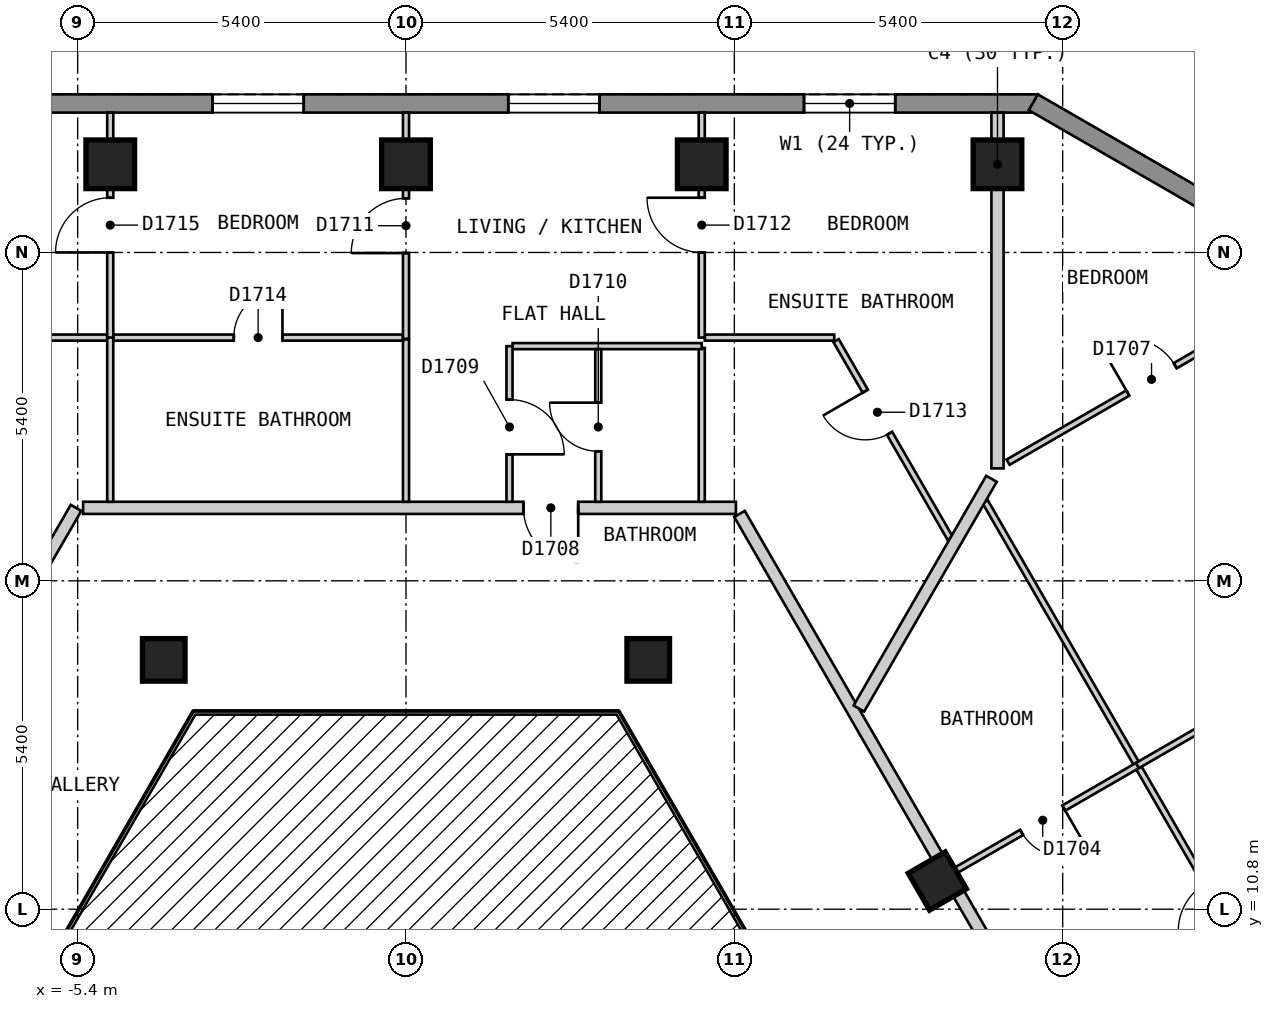
"""IFC4 building model, lengths in metres.
Left out: names, types, materials, properties, quantities, classifications, styles, units other than length and angle.
Written with IfcOpenShell. Run it as: python <this file> out.ifc"""

import sys

from ifc_helpers import new_model, si_unit, direction, frame, frame_2d, origin, origin_2d, place, context, subcontext, project, spatial, polyline, rectangle, outline, extrude, element, fill, save


model = new_model("IFC4")
c1 = context("Model", 3, precision=1e-05, world=origin(), true_north=direction((0.0, 1.0)))
c2 = subcontext(c1, "Body", "Model", "MODEL_VIEW")
j1 = project(units=[si_unit("LENGTHUNIT", "METRE"), si_unit("PLANEANGLEUNIT", "RADIAN")], contexts=[c1])
p1 = place(None, origin())
s1 = spatial("IfcSite", under=j1, at=p1, CompositionType="ELEMENT")
p2 = place(p1, origin())
s2 = spatial("IfcBuilding", under=s1, at=p2, CompositionType="ELEMENT")
p3 = place(p2, frame((0.0, 0.0, 187.2)))
s3 = spatial("IfcBuildingStorey", under=s2, at=p3, CompositionType="ELEMENT", Elevation=187.2)
for number, where, z_axis, x_axis in (
    (1, (9.728, 23.05, 0.0), (0.0, 0.0, 1.0), (-1.0, 0.0, 0.0)),
    (2, (4.864, 23.05, 0.0), (0.0, 0.0, 1.0), (-1.0, 0.0, 0.0)),
    (3, (0.0, 23.05, 0.0), (0.0, 0.0, 1.0), (-1.0, 0.0, 0.0)),
    (4, (-4.864, 23.05, 0.0), (0.0, 0.0, 1.0), (-1.0, 0.0, 0.0)),
):
    element("IfcColumn", number, at=place(p3, frame(where, z_axis=z_axis, x_axis=x_axis)), inside=s3, PredefinedType="COLUMN", context=c2, shape_type="SweptSolid", body=[
        extrude(rectangle(XDim=0.8, YDim=0.8, at=origin_2d()), origin(), (0.0, 0.0, 1.0), 3.0),
    ])
for number, where, z_axis, x_axis in (
    (5, (8.739, 11.263, 0.0), (0.0, 0.0, 1.0), (-0.5, 0.866, 0.0)),
    (6, (3.984, 14.9, 0.0), (0.0, 0.0, 1.0), (1.0, 0.0, 0.0)),
    (7, (-3.984, 14.9, 0.0), (0.0, 0.0, 1.0), (1.0, 0.0, 0.0)),
):
    element("IfcColumn", number, at=place(p3, frame(where, z_axis=z_axis, x_axis=x_axis)), inside=s3, PredefinedType="COLUMN", context=c2, shape_type="SweptSolid", body=[
        extrude(rectangle(XDim=0.7, YDim=0.7, at=origin_2d()), origin(), (0.0, 0.0, 1.0), 3.0),
    ])
p4 = place(p3, frame((10.392, 24.05, 0.0), z_axis=(0.0, 0.0, 1.0), x_axis=(-1.0, 0.0, 0.0)))
e8 = element("IfcWall", 8, at=p4, inside=s3, PredefinedType="SOLIDWALL", context=c2, shape_type="SweptSolid", body=[
    extrude(outline(polyline([(0.0, -0.15), (20.784, -0.15), (20.704, 0.15), (0.08, 0.15), (0.0, -0.15)])), origin(), (0.0, 0.0, 1.0), 2.7),
])
p5 = place(p4, frame((2.346, 0.0, 0.15)))
e9 = element("IfcOpeningElement", 9, at=p5, cuts=e8, PredefinedType="OPENING", context=c2, shape_type="SweptSolid", body=[
    extrude(rectangle(XDim=1.5, YDim=2.1, at=frame_2d((0.75, 1.05))), frame((0.0, 0.16, 0.0), z_axis=(0.0, -1.0, 0.0), x_axis=(1.0, 0.0, 0.0)), (0.0, 0.0, 1.0), 0.32),
])
p6 = place(p4, frame((7.21, 0.0, 0.15)))
e10 = element("IfcOpeningElement", 10, at=p6, cuts=e8, PredefinedType="OPENING", context=c2, shape_type="SweptSolid", body=[
    extrude(rectangle(XDim=1.5, YDim=2.1, at=frame_2d((0.75, 1.05))), frame((0.0, 0.16, 0.0), z_axis=(0.0, -1.0, 0.0), x_axis=(1.0, 0.0, 0.0)), (0.0, 0.0, 1.0), 0.32),
])
p7 = place(p4, frame((12.074, 0.0, 0.15)))
e11 = element("IfcOpeningElement", 11, at=p7, cuts=e8, PredefinedType="OPENING", context=c2, shape_type="SweptSolid", body=[
    extrude(rectangle(XDim=1.5, YDim=2.1, at=frame_2d((0.75, 1.05))), frame((0.0, 0.16, 0.0), z_axis=(0.0, -1.0, 0.0), x_axis=(1.0, 0.0, 0.0)), (0.0, 0.0, 1.0), 0.32),
])
p8 = place(p4, frame((16.938, 0.0, 0.15)))
e12 = element("IfcOpeningElement", 12, at=p8, cuts=e8, PredefinedType="OPENING", context=c2, shape_type="SweptSolid", body=[
    extrude(rectangle(XDim=1.5, YDim=2.1, at=frame_2d((0.75, 1.05))), frame((0.0, 0.16, 0.0), z_axis=(0.0, -1.0, 0.0), x_axis=(1.0, 0.0, 0.0)), (0.0, 0.0, 1.0), 0.32),
])
p9 = place(p3, frame((14.647, 21.57, 0.0), z_axis=(0.0, 0.0, 1.0), x_axis=(-0.866022959057, 0.500004234368, 0.0)))
e13 = element("IfcWall", 13, at=p9, inside=s3, PredefinedType="SOLIDWALL", context=c2, shape_type="SweptSolid", body=[
    extrude(outline(polyline([(0.0, -0.15), (5.0, -0.15), (4.92, 0.15), (0.08, 0.15), (0.0, -0.15)])), origin(), (0.0, 0.0, 1.0), 2.7),
])
p10 = place(p9, frame((0.65, 0.0, 0.15)))
e14 = element("IfcOpeningElement", 14, at=p10, cuts=e13, PredefinedType="OPENING", context=c2, shape_type="SweptSolid", body=[
    extrude(rectangle(XDim=1.2, YDim=2.1, at=frame_2d((0.6, 1.05))), frame((0.0, 0.16, 0.0), z_axis=(0.0, -1.0, 0.0), x_axis=(1.0, 0.0, 0.0)), (0.0, 0.0, 1.0), 0.32),
])
p11 = place(p3, frame((5.485, 17.3, 0.0), z_axis=(0.0, 0.0, 1.0), x_axis=(0.499965832213, -0.866045129667, 0.0)))
e15 = element("IfcWall", 15, at=p11, inside=s3, PredefinedType="PARTITIONING", context=c2, shape_type="SweptSolid", body=[
    extrude(rectangle(XDim=10.739, YDim=0.2, at=frame_2d((5.369, 0.0))), origin(), (0.0, 0.0, 1.0), 2.7),
])
p12 = place(p11, frame((9.047, 0.0, 0.0)))
e16 = element("IfcOpeningElement", 16, at=p12, cuts=e15, PredefinedType="OPENING", context=c2, shape_type="SweptSolid", body=[
    extrude(rectangle(XDim=1.0, YDim=2.1, at=frame_2d((0.5, 1.05))), frame((0.0, 0.11, 0.0), z_axis=(0.0, -1.0, 0.0), x_axis=(1.0, 0.0, 0.0)), (0.0, 0.0, 1.0), 0.22),
])
p13 = place(p3, frame((-5.311, 17.4, 0.0), z_axis=(0.0, 0.0, 1.0), x_axis=(1.0, 0.0, 0.0)))
e17 = element("IfcWall", 17, at=p13, inside=s3, PredefinedType="PARTITIONING", context=c2, shape_type="SweptSolid", body=[
    extrude(rectangle(XDim=10.737, YDim=0.2, at=frame_2d((5.369, 0.0))), origin(), (0.0, 0.0, 1.0), 2.7),
])
p14 = place(p13, frame((7.243, 0.0, 0.0)))
e18 = element("IfcOpeningElement", 18, at=p14, cuts=e17, PredefinedType="OPENING", context=c2, shape_type="SweptSolid", body=[
    extrude(rectangle(XDim=0.9, YDim=2.1, at=frame_2d((0.45, 1.05))), frame((0.0, 0.11, 0.0), z_axis=(0.0, -1.0, 0.0), x_axis=(1.0, 0.0, 0.0)), (0.0, 0.0, 1.0), 0.22),
])
p15 = place(p3, frame((-10.771, 8.145, 0.0), z_axis=(0.0, 0.0, 1.0), x_axis=(0.500048075867, 0.865997645391, 0.0)))
e19 = element("IfcWall", 19, at=p15, inside=s3, PredefinedType="PARTITIONING", context=c2, shape_type="SweptSolid", body=[
    extrude(rectangle(XDim=10.687, YDim=0.2, at=frame_2d((5.344, 0.0))), origin(), (0.0, 0.0, 1.0), 2.7),
])
p16 = place(p15, frame((0.549, 0.0, 0.0)))
e20 = element("IfcOpeningElement", 20, at=p16, cuts=e19, PredefinedType="OPENING", context=c2, shape_type="SweptSolid", body=[
    extrude(rectangle(XDim=1.0, YDim=2.1, at=frame_2d((0.5, 1.05))), frame((0.0, 0.11, 0.0), z_axis=(0.0, -1.0, 0.0), x_axis=(1.0, 0.0, 0.0)), (0.0, 0.0, 1.0), 0.22),
])
p17 = place(p3, frame((7.073, 20.15, 0.0), z_axis=(0.0, 0.0, 1.0), x_axis=(0.499917691695, -0.866072919292, 0.0)))
e21 = element("IfcWall", 21, at=p17, inside=s3, PredefinedType="PARTITIONING", context=c2, shape_type="SweptSolid", body=[
    extrude(rectangle(XDim=3.753, YDim=0.1, at=frame_2d((1.876, 0.0))), origin(), (0.0, 0.0, 1.0), 2.7),
])
p18 = place(p17, frame((0.96, 0.0, 0.0)))
e22 = element("IfcOpeningElement", 22, at=p18, cuts=e21, PredefinedType="OPENING", context=c2, shape_type="SweptSolid", body=[
    extrude(rectangle(XDim=0.8, YDim=2.1, at=frame_2d((0.4, 1.05))), frame((0.0, 0.06, 0.0), z_axis=(0.0, -1.0, 0.0), x_axis=(1.0, 0.0, 0.0)), (0.0, 0.0, 1.0), 0.12),
])
p19 = place(p3, frame((9.526, 17.5, 0.0), z_axis=(0.0, 0.0, 1.0), x_axis=(0.500019134094, -0.866014356428, 0.0)))
e23 = element("IfcWall", 23, at=p19, inside=s3, PredefinedType="PARTITIONING", context=c2, shape_type="SweptSolid", body=[
    extrude(rectangle(XDim=10.97, YDim=0.1, at=frame_2d((5.485, 0.0))), origin(), (0.0, 0.0, 1.0), 2.7),
])
p20 = place(p19, frame((7.25, 0.0, 0.0)))
e24 = element("IfcOpeningElement", 24, at=p20, cuts=e23, PredefinedType="OPENING", context=c2, shape_type="SweptSolid", body=[
    extrude(rectangle(XDim=0.9, YDim=2.1, at=frame_2d((0.45, 1.05))), frame((0.0, 0.06, 0.0), z_axis=(0.0, -1.0, 0.0), x_axis=(1.0, 0.0, 0.0)), (0.0, 0.0, 1.0), 0.12),
])
p21 = place(p3, frame((0.0, 20.17, 0.0), z_axis=(0.0, 0.0, 1.0), x_axis=(0.0, -1.0, 0.0)))
e25 = element("IfcWall", 25, at=p21, inside=s3, PredefinedType="PARTITIONING", context=c2, shape_type="SweptSolid", body=[
    extrude(rectangle(XDim=2.67, YDim=0.1, at=frame_2d((1.335, 0.0))), origin(), (0.0, 0.0, 1.0), 2.7),
])
p22 = place(p3, frame((4.864, 20.03, 0.0), z_axis=(0.0, 0.0, 1.0), x_axis=(0.0, -1.0, 0.0)))
e26 = element("IfcWall", 26, at=p22, inside=s3, PredefinedType="PARTITIONING", context=c2, shape_type="SweptSolid", body=[
    extrude(rectangle(XDim=2.53, YDim=0.1, at=frame_2d((1.265, 0.0))), origin(), (0.0, 0.0, 1.0), 2.7),
])
p23 = place(p3, frame((1.753, 20.06, 0.0), z_axis=(0.0, 0.0, 1.0), x_axis=(1.0, 0.0, 0.0)))
e27 = element("IfcWall", 27, at=p23, inside=s3, PredefinedType="PARTITIONING", context=c2, shape_type="SweptSolid", body=[
    extrude(rectangle(XDim=3.111, YDim=0.1, at=frame_2d((1.556, 0.0))), origin(), (0.0, 0.0, 1.0), 2.7),
])
p24 = place(p3, frame((-6.985, 20.2, 0.0), z_axis=(0.0, 0.0, 1.0), x_axis=(1.0, 0.0, 0.0)))
e28 = element("IfcWall", 28, at=p24, inside=s3, PredefinedType="PARTITIONING", context=c2, shape_type="SweptSolid", body=[
    extrude(rectangle(XDim=6.935, YDim=0.1, at=frame_2d((3.468, 0.0))), origin(), (0.0, 0.0, 1.0), 2.7),
])
p25 = place(p24, frame((4.153, 0.0, 0.0)))
e29 = element("IfcOpeningElement", 29, at=p25, cuts=e28, PredefinedType="OPENING", context=c2, shape_type="SweptSolid", body=[
    extrude(rectangle(XDim=0.8, YDim=2.1, at=frame_2d((0.4, 1.05))), frame((0.0, 0.06, 0.0), z_axis=(0.0, -1.0, 0.0), x_axis=(1.0, 0.0, 0.0)), (0.0, 0.0, 1.0), 0.12),
])
p26 = place(p3, frame((4.914, 20.2, 0.0), z_axis=(0.0, 0.0, 1.0), x_axis=(1.0, 0.0, 0.0)))
e30 = element("IfcWall", 30, at=p26, inside=s3, PredefinedType="PARTITIONING", context=c2, shape_type="SweptSolid", body=[
    extrude(rectangle(XDim=2.129, YDim=0.1, at=frame_2d((1.064, 0.0))), origin(), (0.0, 0.0, 1.0), 2.7),
])
p27 = place(p3, frame((3.162, 17.5, 0.0), z_axis=(0.0, 0.0, 1.0), x_axis=(0.0, 1.0, 0.0)))
e31 = element("IfcWall", 31, at=p27, inside=s3, PredefinedType="PARTITIONING", context=c2, shape_type="SweptSolid", body=[
    extrude(rectangle(XDim=2.51, YDim=0.1, at=frame_2d((1.255, 0.0))), origin(), (0.0, 0.0, 1.0), 2.7),
])
p28 = place(p27, frame((0.83, 0.0, 0.0)))
e32 = element("IfcOpeningElement", 32, at=p28, cuts=e31, PredefinedType="OPENING", context=c2, shape_type="SweptSolid", body=[
    extrude(rectangle(XDim=0.8, YDim=2.1, at=frame_2d((0.4, 1.05))), frame((0.0, 0.06, 0.0), z_axis=(0.0, -1.0, 0.0), x_axis=(1.0, 0.0, 0.0)), (0.0, 0.0, 1.0), 0.12),
])
p29 = place(p3, frame((4.864, 20.2, 0.0), z_axis=(0.0, 0.0, 1.0), x_axis=(0.0, 1.0, 0.0)))
e33 = element("IfcWall", 33, at=p29, inside=s3, PredefinedType="PARTITIONING", context=c2, shape_type="SweptSolid", body=[
    extrude(rectangle(XDim=3.7, YDim=0.1, at=frame_2d((1.85, 0.0))), origin(), (0.0, 0.0, 1.0), 2.7),
])
p30 = place(p29, frame((1.4, 0.0, 0.0)))
e34 = element("IfcOpeningElement", 34, at=p30, cuts=e33, PredefinedType="OPENING", context=c2, shape_type="SweptSolid", body=[
    extrude(rectangle(XDim=0.9, YDim=2.1, at=frame_2d((0.45, 1.05))), frame((0.0, 0.06, 0.0), z_axis=(0.0, -1.0, 0.0), x_axis=(1.0, 0.0, 0.0)), (0.0, 0.0, 1.0), 0.12),
])
p31 = place(p3, frame((1.702, 17.5, 0.0), z_axis=(0.0, 0.0, 1.0), x_axis=(0.0, 1.0, 0.0)))
e35 = element("IfcWall", 35, at=p31, inside=s3, PredefinedType="PARTITIONING", context=c2, shape_type="SweptSolid", body=[
    extrude(rectangle(XDim=2.559, YDim=0.1, at=frame_2d((1.28, 0.0))), origin(), (0.0, 0.0, 1.0), 2.7),
])
p32 = place(p31, frame((0.78, 0.0, 0.0)))
e36 = element("IfcOpeningElement", 36, at=p32, cuts=e35, PredefinedType="OPENING", context=c2, shape_type="SweptSolid", body=[
    extrude(rectangle(XDim=0.9, YDim=2.1, at=frame_2d((0.45, 1.05))), frame((0.0, 0.06, 0.0), z_axis=(0.0, -1.0, 0.0), x_axis=(1.0, 0.0, 0.0)), (0.0, 0.0, 1.0), 0.12),
])
p33 = place(p3, frame((0.0, 20.18, 0.0), z_axis=(0.0, 0.0, 1.0), x_axis=(0.0, 1.0, 0.0)))
e37 = element("IfcWall", 37, at=p33, inside=s3, PredefinedType="PARTITIONING", context=c2, shape_type="SweptSolid", body=[
    extrude(rectangle(XDim=3.72, YDim=0.1, at=frame_2d((1.86, 0.0))), origin(), (0.0, 0.0, 1.0), 2.7),
])
p34 = place(p33, frame((1.41, 0.0, 0.0)))
e38 = element("IfcOpeningElement", 38, at=p34, cuts=e37, PredefinedType="OPENING", context=c2, shape_type="SweptSolid", body=[
    extrude(rectangle(XDim=0.9, YDim=2.1, at=frame_2d((0.45, 1.05))), frame((0.0, 0.06, 0.0), z_axis=(0.0, -1.0, 0.0), x_axis=(1.0, 0.0, 0.0)), (0.0, 0.0, 1.0), 0.12),
])
p35 = place(p3, frame((-4.864, 17.5, 0.0), z_axis=(0.0, 0.0, 1.0), x_axis=(0.0, 1.0, 0.0)))
e39 = element("IfcWall", 39, at=p35, inside=s3, PredefinedType="PARTITIONING", context=c2, shape_type="SweptSolid", body=[
    extrude(rectangle(XDim=2.7, YDim=0.1, at=frame_2d((1.35, 0.0))), origin(), (0.0, 0.0, 1.0), 2.7),
])
p36 = place(p3, frame((8.999, 11.413, 0.0), z_axis=(0.0, 0.0, 1.0), x_axis=(0.866019471182, 0.500010275428, 0.0)))
e40 = element("IfcWall", 40, at=p36, inside=s3, PredefinedType="PARTITIONING", context=c2, shape_type="SweptSolid", body=[
    extrude(rectangle(XDim=3.5, YDim=0.1, at=frame_2d((1.75, 0.0))), origin(), (0.0, 0.0, 1.0), 2.7),
])
p37 = place(p36, frame((1.3, 0.0, 0.0)))
e41 = element("IfcOpeningElement", 41, at=p37, cuts=e40, PredefinedType="OPENING", context=c2, shape_type="SweptSolid", body=[
    extrude(rectangle(XDim=0.8, YDim=2.1, at=frame_2d((0.4, 1.05))), frame((0.0, 0.06, 0.0), z_axis=(0.0, -1.0, 0.0), x_axis=(1.0, 0.0, 0.0)), (0.0, 0.0, 1.0), 0.12),
])
p38 = place(p3, frame((9.902, 18.151, 0.0), z_axis=(0.0, 0.0, 1.0), x_axis=(0.866032278734, 0.499988092049, 0.0)))
e42 = element("IfcWall", 42, at=p38, inside=s3, PredefinedType="PARTITIONING", context=c2, shape_type="SweptSolid", body=[
    extrude(rectangle(XDim=5.649, YDim=0.1, at=frame_2d((2.824, 0.0))), origin(), (0.0, 0.0, 1.0), 2.7),
])
p39 = place(p38, frame((2.274, 0.0, 0.0)))
e43 = element("IfcOpeningElement", 43, at=p39, cuts=e42, PredefinedType="OPENING", context=c2, shape_type="SweptSolid", body=[
    extrude(rectangle(XDim=0.9, YDim=2.1, at=frame_2d((0.45, 1.05))), frame((0.0, 0.06, 0.0), z_axis=(0.0, -1.0, 0.0), x_axis=(1.0, 0.0, 0.0)), (0.0, 0.0, 1.0), 0.12),
])
p40 = place(p3, frame((7.448, 14.1, 0.0), z_axis=(0.0, 0.0, 1.0), x_axis=(0.499961462843, 0.866047652079, 0.0)))
e44 = element("IfcWall", 44, at=p40, inside=s3, PredefinedType="PARTITIONING", context=c2, shape_type="SweptSolid", body=[
    extrude(rectangle(XDim=4.362, YDim=0.2, at=frame_2d((2.181, 0.0))), origin(), (0.0, 0.0, 1.0), 2.7),
])
p41 = place(p3, frame((9.728, 18.049, 0.0), z_axis=(0.0, 0.0, 1.0), x_axis=(0.0, 1.0, 0.0)))
e45 = element("IfcWall", 45, at=p41, inside=s3, PredefinedType="PARTITIONING", context=c2, shape_type="SweptSolid", body=[
    extrude(rectangle(XDim=5.851, YDim=0.2, at=frame_2d((2.925, 0.0))), origin(), (0.0, 0.0, 1.0), 2.7),
])
p42 = place(p3, frame((12.03, 13.163, 0.0), z_axis=(0.0, 0.0, 1.0), x_axis=(0.866035871367, 0.499981869177, 0.0)))
e46 = element("IfcWall", 46, at=p42, inside=s3, PredefinedType="PARTITIONING", context=c2, shape_type="SweptSolid", body=[
    extrude(rectangle(XDim=6.3, YDim=0.1, at=frame_2d((3.15, 0.0))), origin(), (0.0, 0.0, 1.0), 2.7),
])
p43 = place(p42, frame((2.7, 0.0, 0.0)))
e47 = element("IfcOpeningElement", 47, at=p43, cuts=e46, PredefinedType="OPENING", context=c2, shape_type="SweptSolid", body=[
    extrude(rectangle(XDim=0.9, YDim=2.1, at=frame_2d((0.45, 1.05))), frame((0.0, 0.06, 0.0), z_axis=(0.0, -1.0, 0.0), x_axis=(1.0, 0.0, 0.0)), (0.0, 0.0, 1.0), 0.12),
])
p44 = place(p3, frame((-4.864, 20.2, 0.0), z_axis=(0.0, 0.0, 1.0), x_axis=(0.0, 1.0, 0.0)))
e48 = element("IfcWall", 48, at=p44, inside=s3, PredefinedType="PARTITIONING", context=c2, shape_type="SweptSolid", body=[
    extrude(rectangle(XDim=3.7, YDim=0.1, at=frame_2d((1.85, 0.0))), origin(), (0.0, 0.0, 1.0), 2.7),
])
p45 = place(p44, frame((1.4, 0.0, 0.0)))
e49 = element("IfcOpeningElement", 49, at=p45, cuts=e48, PredefinedType="OPENING", context=c2, shape_type="SweptSolid", body=[
    extrude(rectangle(XDim=0.9, YDim=2.1, at=frame_2d((0.45, 1.05))), frame((0.0, 0.06, 0.0), z_axis=(0.0, -1.0, 0.0), x_axis=(1.0, 0.0, 0.0)), (0.0, 0.0, 1.0), 0.12),
])
p46 = place(p5, origin())
e50 = element("IfcWindow", 50, at=p46, inside=s3, PartitioningType="SINGLE_PANEL", PredefinedType="WINDOW", context=c2, shape_type="SweptSolid", body=[
    extrude(rectangle(XDim=1.5, YDim=2.1, at=frame_2d((0.75, 1.05))), frame((0.0, 0.03, 0.0), z_axis=(0.0, -1.0, 0.0), x_axis=(1.0, 0.0, 0.0)), (0.0, 0.0, 1.0), 0.06),
])
fill(e9, e50)
p47 = place(p6, origin())
e51 = element("IfcWindow", 51, at=p47, inside=s3, PartitioningType="SINGLE_PANEL", PredefinedType="WINDOW", context=c2, shape_type="SweptSolid", body=[
    extrude(rectangle(XDim=1.5, YDim=2.1, at=frame_2d((0.75, 1.05))), frame((0.0, 0.03, 0.0), z_axis=(0.0, -1.0, 0.0), x_axis=(1.0, 0.0, 0.0)), (0.0, 0.0, 1.0), 0.06),
])
fill(e10, e51)
p48 = place(p7, origin())
e52 = element("IfcWindow", 52, at=p48, inside=s3, PartitioningType="SINGLE_PANEL", PredefinedType="WINDOW", context=c2, shape_type="SweptSolid", body=[
    extrude(rectangle(XDim=1.5, YDim=2.1, at=frame_2d((0.75, 1.05))), frame((0.0, 0.03, 0.0), z_axis=(0.0, -1.0, 0.0), x_axis=(1.0, 0.0, 0.0)), (0.0, 0.0, 1.0), 0.06),
])
fill(e11, e52)
p49 = place(p37, origin())
e53 = element("IfcDoor", 53, at=p49, inside=s3, OperationType="SINGLE_SWING_RIGHT", PredefinedType="DOOR", context=c2, shape_type="SweptSolid", body=[
    extrude(rectangle(XDim=0.8, YDim=2.1, at=frame_2d((0.4, 1.05))), frame((0.0, 0.025, 0.0), z_axis=(0.0, -1.0, 0.0), x_axis=(1.0, 0.0, 0.0)), (0.0, 0.0, 1.0), 0.05),
])
fill(e41, e53)
p50 = place(p39, origin())
e54 = element("IfcDoor", 54, at=p50, inside=s3, OperationType="SINGLE_SWING_LEFT", PredefinedType="DOOR", context=c2, shape_type="SweptSolid", body=[
    extrude(rectangle(XDim=0.9, YDim=2.1, at=frame_2d((0.45, 1.05))), frame((0.0, 0.025, 0.0), z_axis=(0.0, -1.0, 0.0), x_axis=(1.0, 0.0, 0.0)), (0.0, 0.0, 1.0), 0.05),
])
fill(e43, e54)
p51 = place(p14, origin())
e55 = element("IfcDoor", 55, at=p51, inside=s3, OperationType="SINGLE_SWING_RIGHT", PredefinedType="DOOR", context=c2, shape_type="SweptSolid", body=[
    extrude(rectangle(XDim=0.9, YDim=2.1, at=frame_2d((0.45, 1.05))), frame((0.0, 0.025, 0.0), z_axis=(0.0, -1.0, 0.0), x_axis=(1.0, 0.0, 0.0)), (0.0, 0.0, 1.0), 0.05),
])
fill(e18, e55)
p52 = place(p32, origin())
e56 = element("IfcDoor", 56, at=p52, inside=s3, OperationType="SINGLE_SWING_LEFT", PredefinedType="DOOR", context=c2, shape_type="SweptSolid", body=[
    extrude(rectangle(XDim=0.9, YDim=2.1, at=frame_2d((0.45, 1.05))), frame((0.0, 0.025, 0.0), z_axis=(0.0, -1.0, 0.0), x_axis=(1.0, 0.0, 0.0)), (0.0, 0.0, 1.0), 0.05),
])
fill(e36, e56)
p53 = place(p28, origin())
e57 = element("IfcDoor", 57, at=p53, inside=s3, OperationType="SINGLE_SWING_RIGHT", PredefinedType="DOOR", context=c2, shape_type="SweptSolid", body=[
    extrude(rectangle(XDim=0.8, YDim=2.1, at=frame_2d((0.4, 1.05))), frame((0.0, 0.025, 0.0), z_axis=(0.0, -1.0, 0.0), x_axis=(1.0, 0.0, 0.0)), (0.0, 0.0, 1.0), 0.05),
])
fill(e32, e57)
p54 = place(p34, origin())
e58 = element("IfcDoor", 58, at=p54, inside=s3, OperationType="SINGLE_SWING_LEFT", PredefinedType="DOOR", context=c2, shape_type="SweptSolid", body=[
    extrude(rectangle(XDim=0.9, YDim=2.1, at=frame_2d((0.45, 1.05))), frame((0.0, 0.025, 0.0), z_axis=(0.0, -1.0, 0.0), x_axis=(1.0, 0.0, 0.0)), (0.0, 0.0, 1.0), 0.05),
])
fill(e38, e58)
p55 = place(p30, origin())
e59 = element("IfcDoor", 59, at=p55, inside=s3, OperationType="SINGLE_SWING_RIGHT", PredefinedType="DOOR", context=c2, shape_type="SweptSolid", body=[
    extrude(rectangle(XDim=0.9, YDim=2.1, at=frame_2d((0.45, 1.05))), frame((0.0, 0.025, 0.0), z_axis=(0.0, -1.0, 0.0), x_axis=(1.0, 0.0, 0.0)), (0.0, 0.0, 1.0), 0.05),
])
fill(e34, e59)
p56 = place(p18, origin())
e60 = element("IfcDoor", 60, at=p56, inside=s3, OperationType="SINGLE_SWING_LEFT", PredefinedType="DOOR", context=c2, shape_type="SweptSolid", body=[
    extrude(rectangle(XDim=0.8, YDim=2.1, at=frame_2d((0.4, 1.05))), frame((0.0, 0.025, 0.0), z_axis=(0.0, -1.0, 0.0), x_axis=(1.0, 0.0, 0.0)), (0.0, 0.0, 1.0), 0.05),
])
fill(e22, e60)
p57 = place(p25, origin())
e61 = element("IfcDoor", 61, at=p57, inside=s3, OperationType="SINGLE_SWING_RIGHT", PredefinedType="DOOR", context=c2, shape_type="SweptSolid", body=[
    extrude(rectangle(XDim=0.8, YDim=2.1, at=frame_2d((0.4, 1.05))), frame((0.0, 0.025, 0.0), z_axis=(0.0, -1.0, 0.0), x_axis=(1.0, 0.0, 0.0)), (0.0, 0.0, 1.0), 0.05),
])
fill(e29, e61)
p58 = place(p45, origin())
e62 = element("IfcDoor", 62, at=p58, inside=s3, OperationType="SINGLE_SWING_LEFT", PredefinedType="DOOR", context=c2, shape_type="SweptSolid", body=[
    extrude(rectangle(XDim=0.9, YDim=2.1, at=frame_2d((0.45, 1.05))), frame((0.0, 0.025, 0.0), z_axis=(0.0, -1.0, 0.0), x_axis=(1.0, 0.0, 0.0)), (0.0, 0.0, 1.0), 0.05),
])
fill(e49, e62)
save(model, sys.argv[1])
